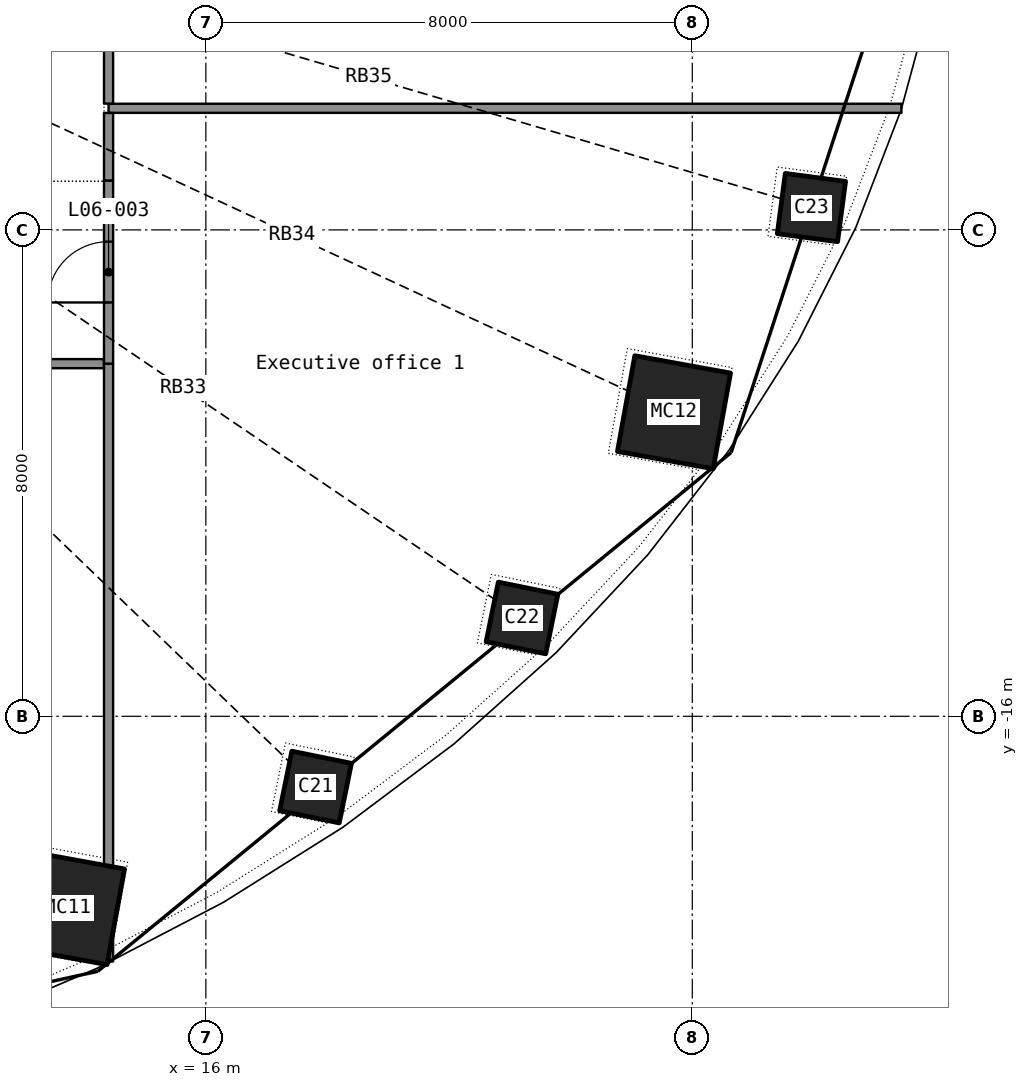
"""IFC4 building model, lengths in metres.
Left out: names, types, materials, properties, quantities, classifications, styles, units other than length and angle.
Written with IfcOpenShell. Run it as: python <this file> out.ifc"""

import sys

from ifc_helpers import new_model, si_unit, direction, frame, frame_2d, origin, origin_2d, place, context, subcontext, project, spatial, rectangle, hollow_rectangle, extrude, element, fill, save


model = new_model("IFC4")
c1 = context("Model", 3, precision=1e-05, world=origin(), true_north=direction((0.0, 1.0)))
c2 = subcontext(c1, "Body", "Model", "MODEL_VIEW")
j1 = project(units=[si_unit("LENGTHUNIT", "METRE"), si_unit("PLANEANGLEUNIT", "RADIAN")], contexts=[c1])
p1 = place(None, origin())
s1 = spatial("IfcSite", under=j1, at=p1, CompositionType="ELEMENT")
p2 = place(p1, origin())
s2 = spatial("IfcBuilding", under=s1, at=p2, CompositionType="ELEMENT")
p3 = place(p2, frame((0.0, 0.0, 32.9)))
s3 = spatial("IfcBuildingStorey", under=s2, at=p3, CompositionType="ELEMENT", Elevation=32.9)
p4 = place(p3, frame((13.731, -19.154, 0.0), z_axis=(-0.017313749, 0.024518128, 0.999549446), x_axis=(-0.906980874, -0.421137445, -0.005380162)))
e1 = element("IfcColumn", 1, at=p4, inside=s3, PredefinedType="COLUMN", context=c2, shape_type="SweptSolid", body=[
    extrude(hollow_rectangle(XDim=1.6, YDim=1.6, WallThickness=0.04, at=origin_2d()), origin(), (0.0, 0.0, 1.0), 4.202),
])
p5 = place(p3, frame((17.804, -17.163, 0.0), z_axis=(-0.022193426, 0.021728642, 0.999517543), x_axis=(-0.828409082, -0.560089034, -0.006218261)))
e2 = element("IfcColumn", 2, at=p5, inside=s3, PredefinedType="COLUMN", context=c2, shape_type="SweptSolid", body=[
    extrude(hollow_rectangle(XDim=1.0, YDim=1.0, WallThickness=0.032, at=origin_2d()), origin(), (0.0, 0.0, 1.0), 4.202),
])
p6 = place(p3, frame((21.2, -14.383, 0.0), z_axis=(-0.026549804, 0.018242097, 0.999481032), x_axis=(-0.719600401, -0.694358526, -0.006442037)))
e3 = element("IfcColumn", 3, at=p6, inside=s3, PredefinedType="COLUMN", context=c2, shape_type="SweptSolid", body=[
    extrude(hollow_rectangle(XDim=1.0, YDim=1.0, WallThickness=0.032, at=origin_2d()), origin(), (0.0, 0.0, 1.0), 4.202),
])
p7 = place(p3, frame((23.699, -10.999, 0.0), z_axis=(-0.029976556, 0.014116866, 0.999450909), x_axis=(-0.580588206, -0.81417588, -0.00591367)))
e4 = element("IfcColumn", 4, at=p7, inside=s3, PredefinedType="COLUMN", context=c2, shape_type="SweptSolid", body=[
    extrude(hollow_rectangle(XDim=1.6, YDim=1.6, WallThickness=0.04, at=origin_2d()), origin(), (0.0, 0.0, 1.0), 4.202),
])
p8 = place(p3, frame((25.96, -7.633, 0.0), z_axis=(-0.032531808, 0.00970145, 0.999423616), x_axis=(-0.409521183, -0.912289636, -0.004474511)))
e5 = element("IfcColumn", 5, at=p8, inside=s3, PredefinedType="COLUMN", context=c2, shape_type="SweptSolid", body=[
    extrude(hollow_rectangle(XDim=1.0, YDim=1.0, WallThickness=0.032, at=origin_2d()), origin(), (0.0, 0.0, 1.0), 4.203),
])
p9 = place(p3, frame((27.439, -6.0, 0.0), z_axis=(0.0, 0.0, 1.0), x_axis=(-1.0, 0.0, 0.0)))
e6 = element("IfcWall", 6, at=p9, inside=s3, PredefinedType="PARTITIONING", context=c2, shape_type="SweptSolid", body=[
    extrude(rectangle(XDim=13.039, YDim=0.15, at=frame_2d((6.52, 0.0))), origin(), (0.0, 0.0, 1.0), 2.8),
])
p10 = place(p3, frame((14.4, -10.2, 0.0), z_axis=(0.0, 0.0, 1.0), x_axis=(0.0, -1.0, 0.0)))
e7 = element("IfcWall", 7, at=p10, inside=s3, PredefinedType="PARTITIONING", context=c2, shape_type="SweptSolid", body=[
    extrude(rectangle(XDim=9.833, YDim=0.15, at=frame_2d((4.917, 0.0))), origin(), (0.0, 0.0, 1.0), 2.8),
])
p11 = place(p3, frame((14.4, -5.923, 0.0), z_axis=(0.0, 0.0, 1.0), x_axis=(0.0, 1.0, 0.0)))
e8 = element("IfcWall", 8, at=p11, inside=s3, PredefinedType="PARTITIONING", context=c2, shape_type="SweptSolid", body=[
    extrude(rectangle(XDim=5.846, YDim=0.15, at=frame_2d((2.923, 0.0))), origin(), (0.0, 0.0, 1.0), 2.8),
])
p12 = place(p11, frame((2.423, 0.0, 0.0)))
e9 = element("IfcOpeningElement", 9, at=p12, cuts=e8, PredefinedType="OPENING", context=c2, shape_type="SweptSolid", body=[
    extrude(rectangle(XDim=1.0, YDim=2.4, at=frame_2d((0.5, 1.2))), frame((0.0, 0.085, 0.0), z_axis=(0.0, -1.0, 0.0), x_axis=(1.0, 0.0, 0.0)), (0.0, 0.0, 1.0), 0.17),
])
p13 = place(p3, frame((8.677, -10.2, 0.0), z_axis=(0.0, 0.0, 1.0), x_axis=(1.0, 0.0, 0.0)))
e10 = element("IfcWall", 10, at=p13, inside=s3, PredefinedType="PARTITIONING", context=c2, shape_type="SweptSolid", body=[
    extrude(rectangle(XDim=5.646, YDim=0.15, at=frame_2d((2.823, 0.0))), origin(), (0.0, 0.0, 1.0), 2.8),
])
p14 = place(p13, frame((2.348, 0.0, 0.0)))
e11 = element("IfcOpeningElement", 11, at=p14, cuts=e10, PredefinedType="OPENING", context=c2, shape_type="SweptSolid", body=[
    extrude(rectangle(XDim=0.95, YDim=2.15, at=frame_2d((0.475, 1.075))), frame((0.0, 0.085, 0.0), z_axis=(0.0, -1.0, 0.0), x_axis=(1.0, 0.0, 0.0)), (0.0, 0.0, 1.0), 0.17),
])
p15 = place(p3, frame((14.4, -10.199, 0.0), z_axis=(0.0, 0.0, 1.0), x_axis=(0.0, 1.0, 0.0)))
e12 = element("IfcWall", 12, at=p15, inside=s3, PredefinedType="PARTITIONING", context=c2, shape_type="SweptSolid", body=[
    extrude(rectangle(XDim=3.011, YDim=0.15, at=frame_2d((1.505, 0.0))), origin(), (0.0, 0.0, 1.0), 2.8),
])
p16 = place(p15, frame((1.006, 0.0, 0.0)))
e13 = element("IfcOpeningElement", 13, at=p16, cuts=e12, PredefinedType="OPENING", context=c2, shape_type="SweptSolid", body=[
    extrude(rectangle(XDim=1.0, YDim=2.4, at=frame_2d((0.5, 1.2))), frame((0.0, 0.085, 0.0), z_axis=(0.0, -1.0, 0.0), x_axis=(1.0, 0.0, 0.0)), (0.0, 0.0, 1.0), 0.17),
])
p17 = place(p3, frame((14.4, -7.187, 0.0), z_axis=(0.0, 0.0, 1.0), x_axis=(0.0, 1.0, 0.0)))
e14 = element("IfcWall", 14, at=p17, inside=s3, PredefinedType="PARTITIONING", context=c2, shape_type="SweptSolid", body=[
    extrude(rectangle(XDim=1.11, YDim=0.15, at=frame_2d((0.555, 0.0))), origin(), (0.0, 0.0, 1.0), 2.8),
])
p18 = place(p16, origin())
e15 = element("IfcDoor", 15, at=p18, inside=s3, OperationType="SINGLE_SWING_LEFT", PredefinedType="DOOR", context=c2, shape_type="SweptSolid", body=[
    extrude(rectangle(XDim=1.0, YDim=2.4, at=frame_2d((0.5, 1.2))), frame((0.0, 0.025, 0.0), z_axis=(0.0, -1.0, 0.0), x_axis=(1.0, 0.0, 0.0)), (0.0, 0.0, 1.0), 0.05),
])
fill(e13, e15)
save(model, sys.argv[1])
